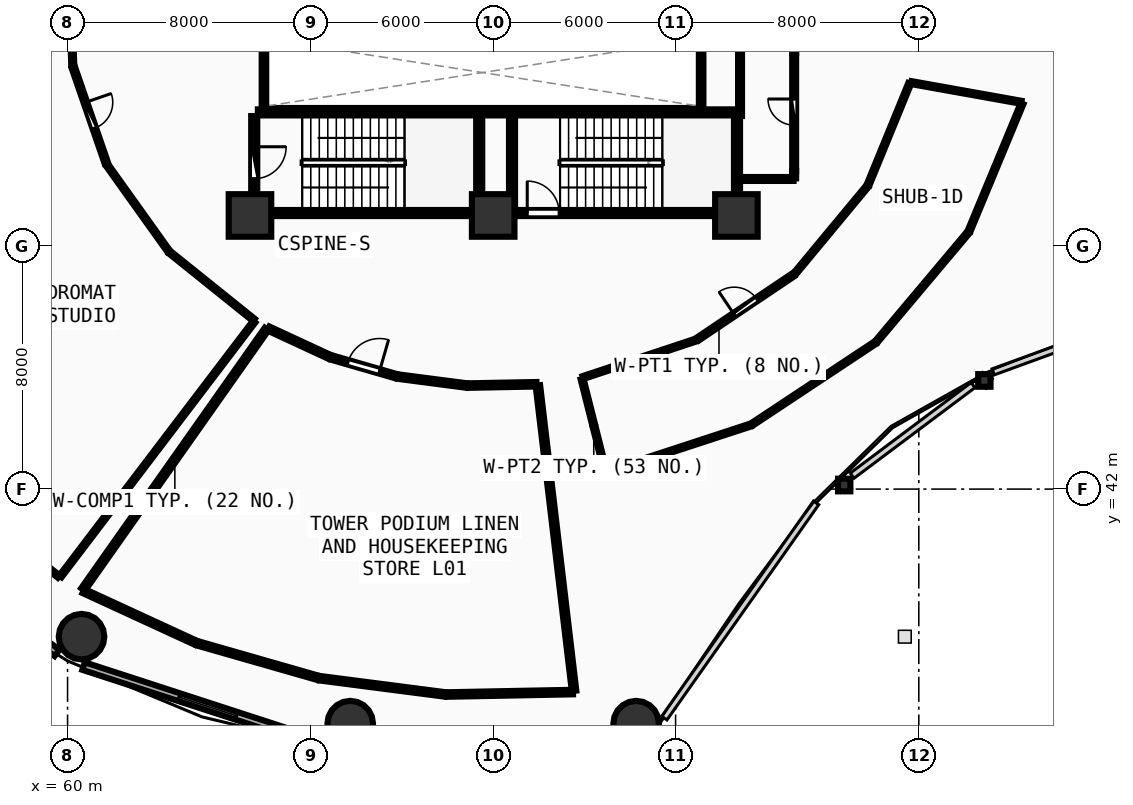
"""IFC4 building model, lengths in metres.
Left out: names, types, materials, properties, quantities, classifications, styles, units other than length and angle.
Written with IfcOpenShell. Run it as: python <this file> out.ifc"""

import sys

from ifc_helpers import new_model, si_unit, direction, frame, frame_2d, origin, origin_2d, place, context, subcontext, project, spatial, rectangle, circle, i_section, extrude, element, fill, save


model = new_model("IFC4")
c1 = context("Model", 3, precision=1e-05, world=origin(), true_north=direction((0.0, 1.0)))
c2 = subcontext(c1, "Body", "Model", "MODEL_VIEW")
j1 = project(units=[si_unit("LENGTHUNIT", "METRE"), si_unit("PLANEANGLEUNIT", "RADIAN")], contexts=[c1])
p1 = place(None, origin())
s1 = spatial("IfcSite", under=j1, at=p1, CompositionType="ELEMENT")
p2 = place(p1, origin())
s2 = spatial("IfcBuilding", under=s1, at=p2, CompositionType="ELEMENT")
p3 = place(p2, frame((0.0, 0.0, 4.5)))
s3 = spatial("IfcBuildingStorey", under=s2, at=p3, CompositionType="ELEMENT", Elevation=4.5)
for number, where, z_axis, x_axis in (
    (1, (66.0, 51.0, 0.0), (0.0, 0.0, 1.0), (1.0, 0.0, 0.0)),
    (2, (74.0, 51.0, 0.0), (0.0, 0.0, 1.0), (1.0, 0.0, 0.0)),
    (3, (82.0, 51.0, 0.0), (0.0, 0.0, 1.0), (1.0, 0.0, 0.0)),
):
    element("IfcColumn", number, at=place(p3, frame(where, z_axis=z_axis, x_axis=x_axis)), inside=s3, PredefinedType="PILASTER", context=c2, shape_type="SweptSolid", body=[
        extrude(rectangle(XDim=1.4, YDim=1.4, at=origin_2d()), origin(), (0.0, 0.0, 1.0), 4.5),
    ])
for number, where, z_axis, x_axis in (
    (4, (60.46, 37.146, 0.0), (0.0, 0.0, 1.0), (1.0, 0.0, 0.0)),
    (5, (69.298, 34.286, 0.0), (0.0, 0.0, 1.0), (1.0, 0.0, 0.0)),
    (6, (78.702, 34.286, 0.0), (0.0, 0.0, 1.0), (1.0, 0.0, 0.0)),
):
    element("IfcColumn", number, at=place(p3, frame(where, z_axis=z_axis, x_axis=x_axis)), inside=s3, PredefinedType="COLUMN", context=c2, shape_type="SweptSolid", body=[
        extrude(circle(Radius=0.75, at=origin_2d()), origin(), (0.0, 0.0, 1.0), 4.5),
    ])
for number, where, z_axis, x_axis in (
    (7, (85.546, 42.134, 0.0), (0.0, 0.0, 1.0), (1.0, 0.0, 0.0)),
    (8, (90.156, 45.574, 0.0), (0.0, 0.0, 1.0), (1.0, 0.0, 0.0)),
):
    element("IfcColumn", number, at=place(p3, frame(where, z_axis=z_axis, x_axis=x_axis)), inside=s3, PredefinedType="COLUMN", context=c2, shape_type="SweptSolid", body=[
        extrude(i_section(OverallWidth=0.406, OverallDepth=0.416, WebThickness=0.029, FlangeThickness=0.048, FilletRadius=0.015, at=origin_2d()), origin(), (0.0, 0.0, 1.0), 4.5),
    ])
p4 = place(p3, frame((53.016, 41.582, 0.0), z_axis=(0.0, 0.0, 1.0), x_axis=(0.80030733173, -0.599590005569, 0.0)))
e9 = element("IfcWall", 9, at=p4, inside=s3, PredefinedType="SOLIDWALL", context=c2, shape_type="SweptSolid", body=[
    extrude(rectangle(XDim=8.291, YDim=0.26, at=frame_2d((4.145, 0.0))), origin(), (0.0, 0.0, 1.0), 4.185),
])
p5 = place(p4, frame((3.145, 0.0, 0.85)))
e10 = element("IfcOpeningElement", 10, at=p5, cuts=e9, PredefinedType="OPENING", context=c2, shape_type="SweptSolid", body=[
    extrude(rectangle(XDim=2.0, YDim=1.75, at=frame_2d((1.0, 0.875))), frame((0.0, 0.14, 0.0), z_axis=(0.0, -1.0, 0.0), x_axis=(1.0, 0.0, 0.0)), (0.0, 0.0, 1.0), 0.28),
])
p6 = place(p3, frame((60.526, 36.178, 0.0), z_axis=(0.0, 0.0, 1.0), x_axis=(0.951039914291, -0.309068085421, 0.0)))
e11 = element("IfcWall", 11, at=p6, inside=s3, PredefinedType="SOLIDWALL", context=c2, shape_type="SweptSolid", body=[
    extrude(rectangle(XDim=8.594, YDim=0.26, at=frame_2d((4.297, 0.0))), origin(), (0.0, 0.0, 1.0), 4.185),
])
p7 = place(p6, frame((3.297, 0.0, 0.85)))
e12 = element("IfcOpeningElement", 12, at=p7, cuts=e11, PredefinedType="OPENING", context=c2, shape_type="SweptSolid", body=[
    extrude(rectangle(XDim=2.0, YDim=1.75, at=frame_2d((1.0, 0.875))), frame((0.0, 0.14, 0.0), z_axis=(0.0, -1.0, 0.0), x_axis=(1.0, 0.0, 0.0)), (0.0, 0.0, 1.0), 0.28),
])
p8 = place(p3, frame((74.0, 51.08, 0.0), z_axis=(0.0, 0.0, 1.0), x_axis=(1.0, 0.0, 0.0)))
e13 = element("IfcWall", 13, at=p8, inside=s3, PredefinedType="SHEAR", context=c2, shape_type="SweptSolid", body=[
    extrude(rectangle(XDim=7.9, YDim=0.2, at=frame_2d((3.95, 0.0))), origin(), (0.0, 0.0, 1.0), 4.2),
])
p9 = place(p8, frame((1.12, 0.0, 0.0)))
e14 = element("IfcOpeningElement", 14, at=p9, cuts=e13, PredefinedType="OPENING", context=c2, shape_type="SweptSolid", body=[
    extrude(rectangle(XDim=1.05, YDim=2.1, at=frame_2d((0.525, 1.05))), frame((0.0, 0.11, 0.0), z_axis=(0.0, -1.0, 0.0), x_axis=(1.0, 0.0, 0.0)), (0.0, 0.0, 1.0), 0.22),
])
p10 = place(p3, frame((82.02, 51.2, 0.0), z_axis=(0.0, 0.0, 1.0), x_axis=(0.0, 1.0, 0.0)))
e15 = element("IfcWall", 15, at=p10, inside=s3, PredefinedType="SHEAR", context=c2, shape_type="SweptSolid", body=[
    extrude(rectangle(XDim=3.07, YDim=0.2, at=frame_2d((1.535, 0.0))), origin(), (0.0, 0.0, 1.0), 4.2),
])
p11 = place(p3, frame((81.9, 54.39, 0.0), z_axis=(0.0, 0.0, 1.0), x_axis=(-1.0, 0.0, 0.0)))
e16 = element("IfcWall", 16, at=p11, inside=s3, PredefinedType="SHEAR", context=c2, shape_type="SweptSolid", body=[
    extrude(rectangle(XDim=8.46, YDim=0.2, at=frame_2d((4.23, 0.0))), origin(), (0.0, 0.0, 1.0), 4.2),
])
p12 = place(p3, frame((74.62, 54.27, 0.0), z_axis=(0.0, 0.0, 1.0), x_axis=(0.0, -1.0, 0.0)))
e17 = element("IfcWall", 17, at=p12, inside=s3, PredefinedType="SHEAR", context=c2, shape_type="SweptSolid", body=[
    extrude(rectangle(XDim=3.07, YDim=0.2, at=frame_2d((1.535, 0.0))), origin(), (0.0, 0.0, 1.0), 4.2),
])
p13 = place(p3, frame((66.26, 51.08, 0.0), z_axis=(0.0, 0.0, 1.0), x_axis=(1.0, 0.0, 0.0)))
e18 = element("IfcWall", 18, at=p13, inside=s3, PredefinedType="SHEAR", context=c2, shape_type="SweptSolid", body=[
    extrude(rectangle(XDim=7.16, YDim=0.2, at=frame_2d((3.58, 0.0))), origin(), (0.0, 0.0, 1.0), 4.2),
])
p14 = place(p3, frame((73.54, 51.2, 0.0), z_axis=(0.0, 0.0, 1.0), x_axis=(0.0, 1.0, 0.0)))
e19 = element("IfcWall", 19, at=p14, inside=s3, PredefinedType="SHEAR", context=c2, shape_type="SweptSolid", body=[
    extrude(rectangle(XDim=3.07, YDim=0.2, at=frame_2d((1.535, 0.0))), origin(), (0.0, 0.0, 1.0), 4.2),
])
p15 = place(p3, frame((73.42, 54.39, 0.0), z_axis=(0.0, 0.0, 1.0), x_axis=(-1.0, 0.0, 0.0)))
e20 = element("IfcWall", 20, at=p15, inside=s3, PredefinedType="SHEAR", context=c2, shape_type="SweptSolid", body=[
    extrude(rectangle(XDim=7.16, YDim=0.2, at=frame_2d((3.58, 0.0))), origin(), (0.0, 0.0, 1.0), 4.2),
])
p16 = place(p3, frame((66.14, 54.27, 0.0), z_axis=(0.0, 0.0, 1.0), x_axis=(0.0, -1.0, 0.0)))
e21 = element("IfcWall", 21, at=p16, inside=s3, PredefinedType="SHEAR", context=c2, shape_type="SweptSolid", body=[
    extrude(rectangle(XDim=3.07, YDim=0.2, at=frame_2d((1.535, 0.0))), origin(), (0.0, 0.0, 1.0), 4.2),
])
p17 = place(p16, frame((1.01, 0.0, 0.0)))
e22 = element("IfcOpeningElement", 22, at=p17, cuts=e21, PredefinedType="OPENING", context=c2, shape_type="SweptSolid", body=[
    extrude(rectangle(XDim=1.05, YDim=2.1, at=frame_2d((0.525, 1.05))), frame((0.0, 0.11, 0.0), z_axis=(0.0, -1.0, 0.0), x_axis=(1.0, 0.0, 0.0)), (0.0, 0.0, 1.0), 0.22),
])
for number, where, z_axis, x_axis in (
    (23, (66.46, 54.48, 0.0), (0.0, 0.0, 1.0), (0.0, 1.0, 0.0)),
    (24, (80.84, 54.48, 0.0), (0.0, 0.0, 1.0), (0.0, 1.0, 0.0)),
):
    element("IfcWall", number, at=place(p3, frame(where, z_axis=z_axis, x_axis=x_axis)), inside=s3, PredefinedType="PARTITIONING", context=c2, shape_type="SweptSolid", body=[
        extrude(rectangle(XDim=2.29, YDim=0.15, at=frame_2d((1.145, 0.0))), origin(), (0.0, 0.0, 1.0), 4.19),
    ])
p18 = place(p3, frame((83.9, 52.46, 0.0), z_axis=(0.0, 0.0, 1.0), x_axis=(0.0, 1.0, 0.0)))
e25 = element("IfcWall", 25, at=p18, inside=s3, PredefinedType="PLUMBINGWALL", context=c2, shape_type="SweptSolid", body=[
    extrude(rectangle(XDim=3.88, YDim=0.13, at=frame_2d((1.94, 0.0))), origin(), (0.0, 0.0, 1.0), 4.19),
])
p19 = place(p18, frame((1.51, 0.0, 0.0)))
e26 = element("IfcOpeningElement", 26, at=p19, cuts=e25, PredefinedType="OPENING", context=c2, shape_type="SweptSolid", body=[
    extrude(rectangle(XDim=0.86, YDim=2.05, at=frame_2d((0.43, 1.025))), frame((0.0, 0.075, 0.0), z_axis=(0.0, -1.0, 0.0), x_axis=(1.0, 0.0, 0.0)), (0.0, 0.0, 1.0), 0.15),
])
p20 = place(p3, frame((60.192, 55.86, 0.0), z_axis=(0.0, 0.0, 1.0), x_axis=(0.326296764791, -0.945267380843, 0.0)))
e27 = element("IfcWall", 27, at=p20, inside=s3, PredefinedType="PARTITIONING", context=c2, shape_type="SweptSolid", body=[
    extrude(rectangle(XDim=3.318, YDim=0.12, at=frame_2d((1.659, 0.0))), origin(), (0.0, 0.0, 1.0), 4.19),
])
p21 = place(p20, frame((1.209, 0.0, 0.0)))
e28 = element("IfcOpeningElement", 28, at=p21, cuts=e27, PredefinedType="OPENING", context=c2, shape_type="SweptSolid", body=[
    extrude(rectangle(XDim=0.9, YDim=2.08, at=frame_2d((0.45, 1.04))), frame((0.0, 0.07, 0.0), z_axis=(0.0, -1.0, 0.0), x_axis=(1.0, 0.0, 0.0)), (0.0, 0.0, 1.0), 0.14),
])
p22 = place(p3, frame((68.693, 46.324, 0.0), z_axis=(0.0, 0.0, 1.0), x_axis=(0.960768545707, -0.277351404504, 0.0)))
e29 = element("IfcWall", 29, at=p22, inside=s3, PredefinedType="PARTITIONING", context=c2, shape_type="SweptSolid", body=[
    extrude(rectangle(XDim=2.181, YDim=0.15, at=frame_2d((1.091, 0.0))), origin(), (0.0, 0.0, 1.0), 4.19),
])
p23 = place(p22, frame((0.551, 0.0, 0.0)))
e30 = element("IfcOpeningElement", 30, at=p23, cuts=e29, PredefinedType="OPENING", context=c2, shape_type="SweptSolid", body=[
    extrude(rectangle(XDim=1.08, YDim=2.1, at=frame_2d((0.54, 1.05))), frame((0.0, 0.085, 0.0), z_axis=(0.0, -1.0, 0.0), x_axis=(1.0, 0.0, 0.0)), (0.0, 0.0, 1.0), 0.17),
])
p24 = place(p3, frame((80.74, 46.942, 0.0), z_axis=(0.0, 0.0, 1.0), x_axis=(0.829949208051, 0.557838966061, 0.0)))
e31 = element("IfcWall", 31, at=p24, inside=s3, PredefinedType="PARTITIONING", context=c2, shape_type="SweptSolid", body=[
    extrude(rectangle(XDim=3.765, YDim=0.12, at=frame_2d((1.882, 0.0))), origin(), (0.0, 0.0, 1.0), 3.585),
])
p25 = place(p24, frame((1.432, 0.0, 0.0)))
e32 = element("IfcOpeningElement", 32, at=p25, cuts=e31, PredefinedType="OPENING", context=c2, shape_type="SweptSolid", body=[
    extrude(rectangle(XDim=0.9, YDim=2.08, at=frame_2d((0.45, 1.04))), frame((0.0, 0.07, 0.0), z_axis=(0.0, -1.0, 0.0), x_axis=(1.0, 0.0, 0.0)), (0.0, 0.0, 1.0), 0.14),
])
p26 = place(p3, frame((82.14, 52.2, 0.0), z_axis=(0.0, 0.0, 1.0), x_axis=(1.0, 0.0, 0.0)))
e33 = element("IfcWall", 33, at=p26, inside=s3, PredefinedType="PLUMBINGWALL", context=c2, shape_type="SweptSolid", body=[
    extrude(rectangle(XDim=1.74, YDim=0.13, at=frame_2d((0.87, 0.0))), origin(), (0.0, 0.0, 1.0), 3.485),
])
for number, where, z_axis, x_axis in (
    (34, (83.9, 52.22, 0.0), (0.0, 0.0, 1.0), (0.0, 1.0, 0.0)),
    (35, (83.9, 56.34, 0.0), (0.0, 0.0, 1.0), (0.0, 1.0, 0.0)),
):
    element("IfcWall", number, at=place(p3, frame(where, z_axis=z_axis, x_axis=x_axis)), inside=s3, PredefinedType="PLUMBINGWALL", context=c2, shape_type="SweptSolid", body=[
        extrude(rectangle(XDim=0.24, YDim=0.13, at=frame_2d((0.12, 0.0))), origin(), (0.0, 0.0, 1.0), 4.19),
    ])
p27 = place(p3, frame((82.12, 56.58, 0.0), z_axis=(0.0, 0.0, 1.0), x_axis=(0.0, -1.0, 0.0)))
e36 = element("IfcWall", 36, at=p27, inside=s3, PredefinedType="PLUMBINGWALL", context=c2, shape_type="SweptSolid", body=[
    extrude(rectangle(XDim=2.31, YDim=0.13, at=frame_2d((1.155, 0.0))), origin(), (0.0, 0.0, 1.0), 3.485),
])
p28 = place(p3, frame((60.058, 59.279, 0.0), z_axis=(0.0, 0.0, 1.0), x_axis=(0.033786827999, -0.999429062142, 0.0)))
e37 = element("IfcWall", 37, at=p28, inside=s3, PredefinedType="PARTITIONING", context=c2, shape_type="SweptSolid", body=[
    extrude(rectangle(XDim=3.324, YDim=0.1, at=frame_2d((1.662, 0.0))), origin(), (0.0, 0.0, 1.0), 3.585),
])
p29 = place(p3, frame((61.317, 52.635, 0.0), z_axis=(0.0, 0.0, 1.0), x_axis=(0.581265057715, -0.813714281968, 0.0)))
e38 = element("IfcWall", 38, at=p29, inside=s3, PredefinedType="PARTITIONING", context=c2, shape_type="SweptSolid", body=[
    extrude(rectangle(XDim=3.439, YDim=0.1, at=frame_2d((1.719, 0.0))), origin(), (0.0, 0.0, 1.0), 3.585),
])
p30 = place(p3, frame((63.37, 49.779, 0.0), z_axis=(0.0, 0.0, 1.0), x_axis=(0.779622016763, -0.626250358067, 0.0)))
e39 = element("IfcWall", 39, at=p30, inside=s3, PredefinedType="PARTITIONING", context=c2, shape_type="SweptSolid", body=[
    extrude(rectangle(XDim=3.539, YDim=0.1, at=frame_2d((1.769, 0.0))), origin(), (0.0, 0.0, 1.0), 3.585),
])
p31 = place(p3, frame((66.136, 47.506, 0.0), z_axis=(0.0, 0.0, 1.0), x_axis=(-0.605364986989, -0.795948008684, 0.0)))
e40 = element("IfcWall", 40, at=p31, inside=s3, PredefinedType="PARTITIONING", context=c2, shape_type="SweptSolid", body=[
    extrude(rectangle(XDim=10.524, YDim=0.1, at=frame_2d((5.262, 0.0))), origin(), (0.0, 0.0, 1.0), 3.585),
])
p32 = place(p3, frame((59.71, 39.123, 0.0), z_axis=(0.0, 0.0, 1.0), x_axis=(-0.781602893215, 0.623776335972, 0.0)))
e41 = element("IfcWall", 41, at=p32, inside=s3, PredefinedType="PARTITIONING", context=c2, shape_type="SweptSolid", body=[
    extrude(rectangle(XDim=6.485, YDim=0.1, at=frame_2d((3.242, 0.0))), origin(), (0.0, 0.0, 1.0), 4.19),
])
p33 = place(p3, frame((66.607, 47.281, 0.0), z_axis=(0.0, 0.0, 1.0), x_axis=(0.907209153003, -0.420679869625, 0.0)))
e42 = element("IfcWall", 42, at=p33, inside=s3, PredefinedType="PARTITIONING", context=c2, shape_type="SweptSolid", body=[
    extrude(rectangle(XDim=2.195, YDim=0.15, at=frame_2d((1.097, 0.0))), origin(), (0.0, 0.0, 1.0), 3.585),
])
p34 = place(p3, frame((70.886, 45.698, 0.0), z_axis=(0.0, 0.0, 1.0), x_axis=(0.99164598848, -0.128989276811, 0.0)))
e43 = element("IfcWall", 43, at=p34, inside=s3, PredefinedType="PARTITIONING", context=c2, shape_type="SweptSolid", body=[
    extrude(rectangle(XDim=2.237, YDim=0.15, at=frame_2d((1.119, 0.0))), origin(), (0.0, 0.0, 1.0), 4.19),
])
p35 = place(p3, frame((73.184, 45.405, 0.0), z_axis=(0.0, 0.0, 1.0), x_axis=(0.999812026425, 0.019388445441, 0.0)))
e44 = element("IfcWall", 44, at=p35, inside=s3, PredefinedType="PARTITIONING", context=c2, shape_type="SweptSolid", body=[
    extrude(rectangle(XDim=2.241, YDim=0.15, at=frame_2d((1.121, 0.0))), origin(), (0.0, 0.0, 1.0), 4.19),
])
p36 = place(p3, frame((75.47, 45.409, 0.0), z_axis=(0.0, 0.0, 1.0), x_axis=(0.117716479822, -0.993047244787, 0.0)))
e45 = element("IfcWall", 45, at=p36, inside=s3, PredefinedType="PARTITIONING", context=c2, shape_type="SweptSolid", body=[
    extrude(rectangle(XDim=10.115, YDim=0.15, at=frame_2d((5.057, 0.0))), origin(), (0.0, 0.0, 1.0), 3.885),
])
p37 = place(p3, frame((76.625, 35.324, 0.0), z_axis=(0.0, 0.0, 1.0), x_axis=(-0.999812033518, -0.019388079631, 0.0)))
e46 = element("IfcWall", 46, at=p37, inside=s3, PredefinedType="PARTITIONING", context=c2, shape_type="SweptSolid", body=[
    extrude(rectangle(XDim=4.143, YDim=0.15, at=frame_2d((2.071, 0.0))), origin(), (0.0, 0.0, 1.0), 4.19),
])
p38 = place(p3, frame((72.403, 35.248, 0.0), z_axis=(0.0, 0.0, 1.0), x_axis=(-0.991723129769, 0.128394835881, 0.0)))
e47 = element("IfcWall", 47, at=p38, inside=s3, PredefinedType="PARTITIONING", context=c2, shape_type="SweptSolid", body=[
    extrude(rectangle(XDim=4.134, YDim=0.15, at=frame_2d((2.067, 0.0))), origin(), (0.0, 0.0, 1.0), 3.585),
])
p39 = place(p3, frame((68.226, 35.795, 0.0), z_axis=(0.0, 0.0, 1.0), x_axis=(-0.961332891956, 0.275388944666, 0.0)))
e48 = element("IfcWall", 48, at=p39, inside=s3, PredefinedType="PARTITIONING", context=c2, shape_type="SweptSolid", body=[
    extrude(rectangle(XDim=4.104, YDim=0.15, at=frame_2d((2.052, 0.0))), origin(), (0.0, 0.0, 1.0), 4.19),
])
p40 = place(p3, frame((64.206, 36.953, 0.0), z_axis=(0.0, 0.0, 1.0), x_axis=(-0.908344989121, 0.418221688508, 0.0)))
e49 = element("IfcWall", 49, at=p40, inside=s3, PredefinedType="PARTITIONING", context=c2, shape_type="SweptSolid", body=[
    extrude(rectangle(XDim=4.054, YDim=0.15, at=frame_2d((2.027, 0.0))), origin(), (0.0, 0.0, 1.0), 3.585),
])
p41 = place(p3, frame((60.51, 38.698, 0.0), z_axis=(0.0, 0.0, 1.0), x_axis=(0.576068501476, 0.817401420116, 0.0)))
e50 = element("IfcWall", 50, at=p41, inside=s3, PredefinedType="PARTITIONING", context=c2, shape_type="SweptSolid", body=[
    extrude(rectangle(XDim=10.481, YDim=0.15, at=frame_2d((5.241, 0.0))), origin(), (0.0, 0.0, 1.0), 3.585),
])
p42 = place(p3, frame((76.953, 45.669, 0.0), z_axis=(0.0, 0.0, 1.0), x_axis=(0.949089658177, 0.31500606461, 0.0)))
e51 = element("IfcWall", 51, at=p42, inside=s3, PredefinedType="PARTITIONING", context=c2, shape_type="SweptSolid", body=[
    extrude(rectangle(XDim=3.898, YDim=0.1, at=frame_2d((1.949, 0.0))), origin(), (0.0, 0.0, 1.0), 4.19),
])
p43 = place(p3, frame((83.939, 49.107, 0.0), z_axis=(0.0, 0.0, 1.0), x_axis=(0.638393231466, 0.769710388405, 0.0)))
e52 = element("IfcWall", 52, at=p43, inside=s3, PredefinedType="PARTITIONING", context=c2, shape_type="SweptSolid", body=[
    extrude(rectangle(XDim=3.69, YDim=0.1, at=frame_2d((1.845, 0.0))), origin(), (0.0, 0.0, 1.0), 3.585),
])
p44 = place(p3, frame((86.336, 52.015, 0.0), z_axis=(0.0, 0.0, 1.0), x_axis=(0.379262523909, 0.925289110472, 0.0)))
e53 = element("IfcWall", 53, at=p44, inside=s3, PredefinedType="PARTITIONING", context=c2, shape_type="SweptSolid", body=[
    extrude(rectangle(XDim=3.593, YDim=0.1, at=frame_2d((1.796, 0.0))), origin(), (0.0, 0.0, 1.0), 4.19),
])
p45 = place(p3, frame((87.753, 55.369, 0.0), z_axis=(0.0, 0.0, 1.0), x_axis=(0.98438649623, -0.176020527328, 0.0)))
e54 = element("IfcWall", 54, at=p45, inside=s3, PredefinedType="PARTITIONING", context=c2, shape_type="SweptSolid", body=[
    extrude(rectangle(XDim=3.676, YDim=0.1, at=frame_2d((1.838, 0.0))), origin(), (0.0, 0.0, 1.0), 3.945),
])
p46 = place(p3, frame((91.396, 54.678, 0.0), z_axis=(0.0, 0.0, 1.0), x_axis=(-0.383734407675, -0.923443503614, 0.0)))
e55 = element("IfcWall", 55, at=p46, inside=s3, PredefinedType="PARTITIONING", context=c2, shape_type="SweptSolid", body=[
    extrude(rectangle(XDim=4.527, YDim=0.1, at=frame_2d((2.263, 0.0))), origin(), (0.0, 0.0, 1.0), 3.585),
])
p47 = place(p3, frame((89.617, 50.43, 0.0), z_axis=(0.0, 0.0, 1.0), x_axis=(-0.643707173648, -0.765271895861, 0.0)))
e56 = element("IfcWall", 56, at=p47, inside=s3, PredefinedType="PARTITIONING", context=c2, shape_type="SweptSolid", body=[
    extrude(rectangle(XDim=4.667, YDim=0.1, at=frame_2d((2.333, 0.0))), origin(), (0.0, 0.0, 1.0), 3.585),
])
p48 = place(p3, frame((86.554, 46.806, 0.0), z_axis=(0.0, 0.0, 1.0), x_axis=(-0.833594148674, -0.552377402956, 0.0)))
e57 = element("IfcWall", 57, at=p48, inside=s3, PredefinedType="PARTITIONING", context=c2, shape_type="SweptSolid", body=[
    extrude(rectangle(XDim=4.831, YDim=0.1, at=frame_2d((2.416, 0.0))), origin(), (0.0, 0.0, 1.0), 3.585),
])
p49 = place(p3, frame((82.455, 44.103, 0.0), z_axis=(0.0, 0.0, 1.0), x_axis=(-0.950308776872, -0.311308895794, 0.0)))
e58 = element("IfcWall", 58, at=p49, inside=s3, PredefinedType="PARTITIONING", context=c2, shape_type="SweptSolid", body=[
    extrude(rectangle(XDim=4.963, YDim=0.1, at=frame_2d((2.481, 0.0))), origin(), (0.0, 0.0, 1.0), 3.585),
])
p50 = place(p3, frame((77.691, 42.584, 0.0), z_axis=(0.0, 0.0, 1.0), x_axis=(-0.244940078033, 0.969538219037, 0.0)))
e59 = element("IfcWall", 59, at=p50, inside=s3, PredefinedType="PARTITIONING", context=c2, shape_type="SweptSolid", body=[
    extrude(rectangle(XDim=3.129, YDim=0.1, at=frame_2d((1.564, 0.0))), origin(), (0.0, 0.0, 1.0), 3.945),
])
p51 = place(p7, origin())
e60 = element("IfcWindow", 60, at=p51, inside=s3, PartitioningType="SINGLE_PANEL", PredefinedType="WINDOW", context=c2, shape_type="SweptSolid", body=[
    extrude(rectangle(XDim=2.0, YDim=1.75, at=frame_2d((1.0, 0.875))), frame((0.0, 0.03, 0.0), z_axis=(0.0, -1.0, 0.0), x_axis=(1.0, 0.0, 0.0)), (0.0, 0.0, 1.0), 0.06),
])
fill(e12, e60)
p52 = place(p9, origin())
e61 = element("IfcDoor", 61, at=p52, inside=s3, OperationType="SINGLE_SWING_LEFT", PredefinedType="DOOR", context=c2, shape_type="SweptSolid", body=[
    extrude(rectangle(XDim=1.05, YDim=2.1, at=frame_2d((0.525, 1.05))), frame((0.0, 0.025, 0.0), z_axis=(0.0, -1.0, 0.0), x_axis=(1.0, 0.0, 0.0)), (0.0, 0.0, 1.0), 0.05),
])
fill(e14, e61)
p53 = place(p17, origin())
e62 = element("IfcDoor", 62, at=p53, inside=s3, OperationType="SINGLE_SWING_LEFT", PredefinedType="DOOR", context=c2, shape_type="SweptSolid", body=[
    extrude(rectangle(XDim=1.05, YDim=2.1, at=frame_2d((0.525, 1.05))), frame((0.0, 0.025, 0.0), z_axis=(0.0, -1.0, 0.0), x_axis=(1.0, 0.0, 0.0)), (0.0, 0.0, 1.0), 0.05),
])
fill(e22, e62)
p54 = place(p19, origin())
e63 = element("IfcDoor", 63, at=p54, inside=s3, OperationType="SINGLE_SWING_RIGHT", PredefinedType="DOOR", context=c2, shape_type="SweptSolid", body=[
    extrude(rectangle(XDim=0.86, YDim=2.05, at=frame_2d((0.43, 1.025))), frame((0.0, 0.025, 0.0), z_axis=(0.0, -1.0, 0.0), x_axis=(1.0, 0.0, 0.0)), (0.0, 0.0, 1.0), 0.05),
])
fill(e26, e63)
p55 = place(p21, origin())
e64 = element("IfcDoor", 64, at=p55, inside=s3, OperationType="SINGLE_SWING_LEFT", PredefinedType="DOOR", context=c2, shape_type="SweptSolid", body=[
    extrude(rectangle(XDim=0.9, YDim=2.08, at=frame_2d((0.45, 1.04))), frame((0.0, 0.025, 0.0), z_axis=(0.0, -1.0, 0.0), x_axis=(1.0, 0.0, 0.0)), (0.0, 0.0, 1.0), 0.05),
])
fill(e28, e64)
p56 = place(p23, origin())
e65 = element("IfcDoor", 65, at=p56, inside=s3, OperationType="SINGLE_SWING_RIGHT", PredefinedType="DOOR", context=c2, shape_type="SweptSolid", body=[
    extrude(rectangle(XDim=1.08, YDim=2.1, at=frame_2d((0.54, 1.05))), frame((0.0, 0.025, 0.0), z_axis=(0.0, -1.0, 0.0), x_axis=(1.0, 0.0, 0.0)), (0.0, 0.0, 1.0), 0.05),
])
fill(e30, e65)
p57 = place(p25, origin())
e66 = element("IfcDoor", 66, at=p57, inside=s3, OperationType="SINGLE_SWING_LEFT", PredefinedType="DOOR", context=c2, shape_type="SweptSolid", body=[
    extrude(rectangle(XDim=0.9, YDim=2.08, at=frame_2d((0.45, 1.04))), frame((0.0, 0.025, 0.0), z_axis=(0.0, -1.0, 0.0), x_axis=(1.0, 0.0, 0.0)), (0.0, 0.0, 1.0), 0.05),
])
fill(e32, e66)
save(model, sys.argv[1])
